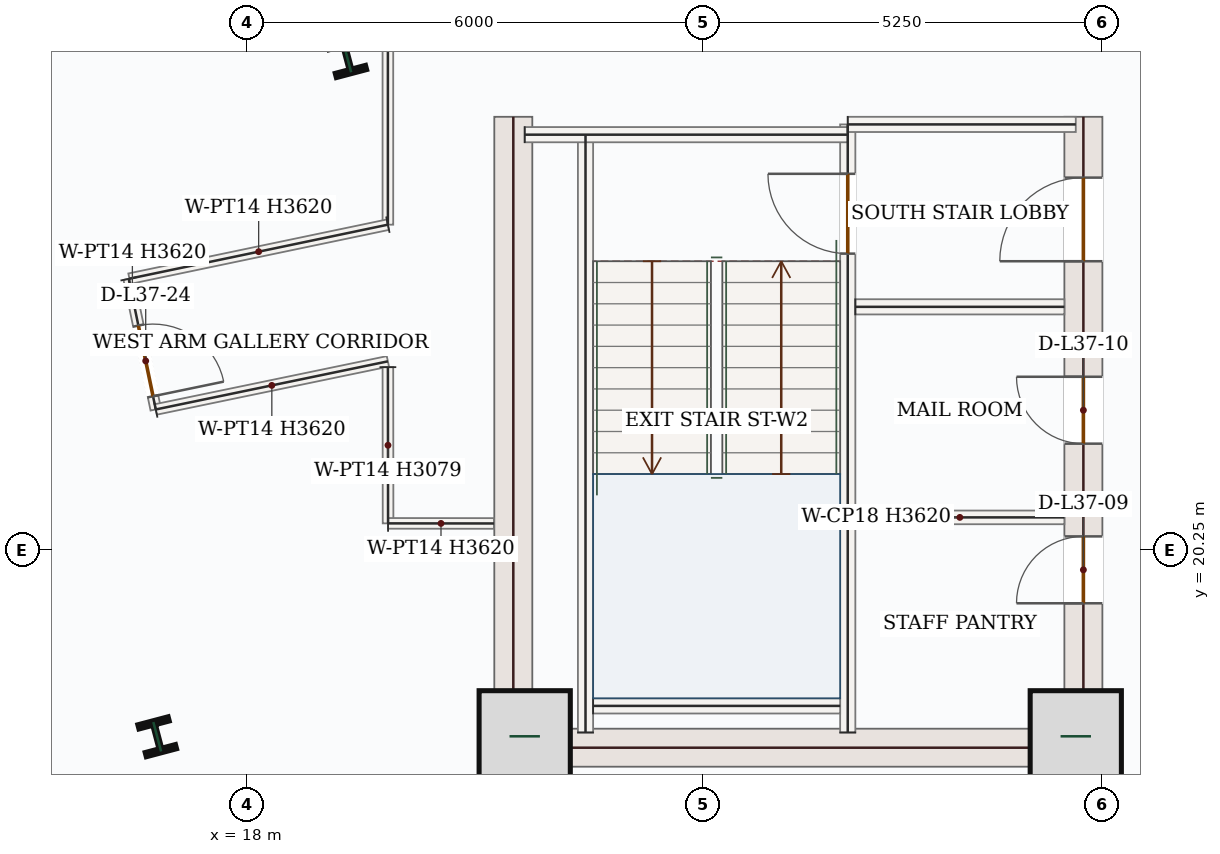
"""IFC4 building model, lengths in metres.
Left out: names, types, materials, properties, quantities, classifications, styles, units other than length and angle.
Written with IfcOpenShell. Run it as: python <this file> out.ifc"""

import sys

from ifc_helpers import new_model, si_unit, direction, frame, frame_2d, origin, origin_2d, place, context, subcontext, project, spatial, rectangle, i_section, extrude, source, transform, mapped, element, fill, save


model = new_model("IFC4")
c1 = context("Model", 3, precision=1e-05, world=origin(), true_north=direction((0.0, 1.0)))
c2 = subcontext(c1, "Body", "Model", "MODEL_VIEW")
j1 = project(units=[si_unit("LENGTHUNIT", "METRE"), si_unit("PLANEANGLEUNIT", "RADIAN")], contexts=[c1])
p1 = place(None, origin())
s1 = spatial("IfcSite", under=j1, at=p1, CompositionType="ELEMENT")
p2 = place(p1, origin())
s2 = spatial("IfcBuilding", under=s1, at=p2, CompositionType="ELEMENT")
p3 = place(p2, frame((0.0, 0.0, 162.9)))
s3 = spatial("IfcBuildingStorey", under=s2, at=p3, CompositionType="ELEMENT", Elevation=162.9)
m1 = source(origin(), c2, "Body", "SweptSolid", [
    extrude(rectangle(XDim=8.55, YDim=0.5, at=frame_2d((4.275, 0.0))), origin(), (0.0, 0.0, 1.0), 3.62),
])
p4 = place(p3, frame((21.5, 17.4, 0.0), z_axis=(0.0, 0.0, 1.0), x_axis=(0.0, 1.0, 0.0)))
e1 = element("IfcWall", 1, at=p4, inside=s3, PredefinedType="SHEAR", context=c2, shape_type="MappedRepresentation", body=[
    mapped(m1, transform((0.0, 0.0, 0.0), x_axis=(1.0, 0.0, 0.0), y_axis=(0.0, 1.0, 0.0), z_axis=(0.0, 0.0, 1.0), scale=1.0)),
])
p5 = place(p3, frame((29.0, 17.4, 0.0), z_axis=(0.0, 0.0, 1.0), x_axis=(0.0, 1.0, 0.0)))
e2 = element("IfcWall", 2, at=p5, inside=s3, PredefinedType="SHEAR", context=c2, shape_type="SweptSolid", body=[
    extrude(rectangle(XDim=8.55, YDim=0.5, at=frame_2d((4.275, 0.0))), origin(), (0.0, 0.0, 1.0), 3.62),
])
p6 = place(p5, frame((6.65, 0.0, 0.0)))
e3 = element("IfcOpeningElement", 3, at=p6, cuts=e2, PredefinedType="OPENING", context=c2, shape_type="SweptSolid", body=[
    extrude(rectangle(XDim=1.1, YDim=2.2, at=frame_2d((0.55, 1.1))), frame((0.0, 0.26, 0.0), z_axis=(0.0, -1.0, 0.0), x_axis=(1.0, 0.0, 0.0)), (0.0, 0.0, 1.0), 0.52),
])
p7 = place(p5, frame((2.15, 0.0, 0.0)))
e4 = element("IfcOpeningElement", 4, at=p7, cuts=e2, PredefinedType="OPENING", context=c2, shape_type="SweptSolid", body=[
    extrude(rectangle(XDim=0.88, YDim=2.1, at=frame_2d((0.44, 1.05))), frame((0.0, 0.26, 0.0), z_axis=(0.0, -1.0, 0.0), x_axis=(1.0, 0.0, 0.0)), (0.0, 0.0, 1.0), 0.52),
])
p8 = place(p5, frame((4.25, 0.0, 0.0)))
e5 = element("IfcOpeningElement", 5, at=p8, cuts=e2, PredefinedType="OPENING", context=c2, shape_type="SweptSolid", body=[
    extrude(rectangle(XDim=0.88, YDim=2.1, at=frame_2d((0.44, 1.05))), frame((0.0, 0.26, 0.0), z_axis=(0.0, -1.0, 0.0), x_axis=(1.0, 0.0, 0.0)), (0.0, 0.0, 1.0), 0.52),
])
m2 = source(origin(), c2, "Body", "SweptSolid", [
    extrude(rectangle(XDim=7.0, YDim=0.5, at=frame_2d((3.5, 0.0))), origin(), (0.0, 0.0, 1.0), 3.62),
])
p9 = place(p3, frame((21.75, 17.65, 0.0), z_axis=(0.0, 0.0, 1.0), x_axis=(1.0, 0.0, 0.0)))
e6 = element("IfcWall", 6, at=p9, inside=s3, PredefinedType="SHEAR", context=c2, shape_type="MappedRepresentation", body=[
    mapped(m2, transform((0.0, 0.0, 0.0), x_axis=(1.0, 0.0, 0.0), y_axis=(0.0, 1.0, 0.0), z_axis=(0.0, 0.0, 1.0), scale=1.0)),
])
m3 = source(origin(), c2, "Body", "SweptSolid", [
    extrude(rectangle(XDim=1.2, YDim=1.2, at=origin_2d()), origin(), (0.0, 0.0, 1.0), 3.9),
])
for number, where, z_axis, x_axis in (
    (7, (21.65, 17.8, 0.0), (0.0, 0.0, 1.0), (1.0, 0.0, 0.0)),
    (8, (28.9, 17.8, 0.0), (0.0, 0.0, 1.0), (1.0, 0.0, 0.0)),
):
    element("IfcColumn", number, at=place(p3, frame(where, z_axis=z_axis, x_axis=x_axis)), inside=s3, PredefinedType="COLUMN", context=c2, shape_type="MappedRepresentation", body=[
        mapped(m3, transform((0.0, 0.0, 0.0), x_axis=(1.0, 0.0, 0.0), y_axis=(0.0, 1.0, 0.0), z_axis=(0.0, 0.0, 1.0), scale=1.0)),
    ])
m4 = source(origin(), c2, "Body", "SweptSolid", [
    extrude(i_section(OverallWidth=0.412, OverallDepth=0.435, WebThickness=0.036, FlangeThickness=0.057, FilletRadius=0.018, at=origin_2d()), origin(), (0.0, 0.0, 1.0), 3.9),
])
for number, where, z_axis, x_axis in (
    (9, (19.316, 26.729, 0.0), (0.0, 0.0, 1.0), (0.967, 0.255, 0.0)),
    (10, (16.815, 17.794, 0.0), (0.0, 0.0, 1.0), (0.967, 0.255, 0.0)),
):
    element("IfcColumn", number, at=place(p3, frame(where, z_axis=z_axis, x_axis=x_axis)), inside=s3, PredefinedType="COLUMN", context=c2, shape_type="MappedRepresentation", body=[
        mapped(m4, transform((0.0, 0.0, 0.0), x_axis=(1.0, 0.0, 0.0), y_axis=(0.0, 1.0, 0.0), z_axis=(0.0, 0.0, 1.0), scale=1.0)),
    ])
m5 = source(origin(), c2, "Body", "SweptSolid", [
    extrude(rectangle(XDim=7.87, YDim=0.2, at=frame_2d((3.935, 0.0))), origin(), (0.0, 0.0, 1.0), 3.62),
])
p10 = place(p3, frame((22.45, 17.85, 0.0), z_axis=(0.0, 0.0, 1.0), x_axis=(0.0, 1.0, 0.0)))
e11 = element("IfcWall", 11, at=p10, inside=s3, PredefinedType="SOLIDWALL", context=c2, shape_type="MappedRepresentation", body=[
    mapped(m5, transform((0.0, 0.0, 0.0), x_axis=(1.0, 0.0, 0.0), y_axis=(0.0, 1.0, 0.0), z_axis=(0.0, 0.0, 1.0), scale=1.0)),
])
p11 = place(p3, frame((25.9, 17.85, 0.0), z_axis=(0.0, 0.0, 1.0), x_axis=(0.0, 1.0, 0.0)))
e12 = element("IfcWall", 12, at=p11, inside=s3, PredefinedType="SOLIDWALL", context=c2, shape_type="SweptSolid", body=[
    extrude(rectangle(XDim=8.0, YDim=0.2, at=frame_2d((4.0, 0.0))), origin(), (0.0, 0.0, 1.0), 3.62),
])
p12 = place(p11, frame((6.3, 0.0, 0.0)))
e13 = element("IfcOpeningElement", 13, at=p12, cuts=e12, PredefinedType="OPENING", context=c2, shape_type="SweptSolid", body=[
    extrude(rectangle(XDim=1.05, YDim=2.15, at=frame_2d((0.525, 1.075))), frame((0.0, 0.11, 0.0), z_axis=(0.0, -1.0, 0.0), x_axis=(1.0, 0.0, 0.0)), (0.0, 0.0, 1.0), 0.22),
])
m6 = source(origin(), c2, "Body", "SweptSolid", [
    extrude(rectangle(XDim=4.25, YDim=0.2, at=frame_2d((2.125, 0.0))), origin(), (0.0, 0.0, 1.0), 3.62),
])
p13 = place(p3, frame((21.65, 25.715, 0.0), z_axis=(0.0, 0.0, 1.0), x_axis=(1.0, 0.0, 0.0)))
e14 = element("IfcWall", 14, at=p13, inside=s3, PredefinedType="SOLIDWALL", context=c2, shape_type="MappedRepresentation", body=[
    mapped(m6, transform((0.0, 0.0, 0.0), x_axis=(1.0, 0.0, 0.0), y_axis=(0.0, 1.0, 0.0), z_axis=(0.0, 0.0, 1.0), scale=1.0)),
])
m7 = source(origin(), c2, "Body", "SweptSolid", [
    extrude(rectangle(XDim=3.0, YDim=0.2, at=frame_2d((1.5, 0.0))), origin(), (0.0, 0.0, 1.0), 3.62),
])
p14 = place(p3, frame((25.9, 25.85, 0.0), z_axis=(0.0, 0.0, 1.0), x_axis=(1.0, 0.0, 0.0)))
e15 = element("IfcWall", 15, at=p14, inside=s3, PredefinedType="SOLIDWALL", context=c2, shape_type="MappedRepresentation", body=[
    mapped(m7, transform((0.0, 0.0, 0.0), x_axis=(1.0, 0.0, 0.0), y_axis=(0.0, 1.0, 0.0), z_axis=(0.0, 0.0, 1.0), scale=1.0)),
])
m8 = source(origin(), c2, "Body", "SweptSolid", [
    extrude(rectangle(XDim=3.25, YDim=0.2, at=frame_2d((1.625, 0.0))), origin(), (0.0, 0.0, 1.0), 3.62),
])
p15 = place(p3, frame((22.55, 18.2, 0.0), z_axis=(0.0, 0.0, 1.0), x_axis=(1.0, 0.0, 0.0)))
e16 = element("IfcWall", 16, at=p15, inside=s3, PredefinedType="SOLIDWALL", context=c2, shape_type="MappedRepresentation", body=[
    mapped(m8, transform((0.0, 0.0, 0.0), x_axis=(1.0, 0.0, 0.0), y_axis=(0.0, 1.0, 0.0), z_axis=(0.0, 0.0, 1.0), scale=1.0)),
])
m9 = source(origin(), c2, "Body", "SweptSolid", [
    extrude(rectangle(XDim=2.75, YDim=0.2, at=frame_2d((1.375, 0.0))), origin(), (0.0, 0.0, 1.0), 3.62),
])
p16 = place(p3, frame((26.0, 23.45, 0.0), z_axis=(0.0, 0.0, 1.0), x_axis=(1.0, 0.0, 0.0)))
e17 = element("IfcWall", 17, at=p16, inside=s3, PredefinedType="SOLIDWALL", context=c2, shape_type="MappedRepresentation", body=[
    mapped(m9, transform((0.0, 0.0, 0.0), x_axis=(1.0, 0.0, 0.0), y_axis=(0.0, 1.0, 0.0), z_axis=(0.0, 0.0, 1.0), scale=1.0)),
])
m10 = source(origin(), c2, "Body", "SweptSolid", [
    extrude(rectangle(XDim=2.75, YDim=0.18, at=frame_2d((1.375, 0.0))), origin(), (0.0, 0.0, 1.0), 3.62),
])
p17 = place(p3, frame((26.0, 20.68, 0.0), z_axis=(0.0, 0.0, 1.0), x_axis=(1.0, 0.0, 0.0)))
e18 = element("IfcWall", 18, at=p17, inside=s3, PredefinedType="PARTITIONING", context=c2, shape_type="MappedRepresentation", body=[
    mapped(m10, transform((0.0, 0.0, 0.0), x_axis=(1.0, 0.0, 0.0), y_axis=(0.0, 1.0, 0.0), z_axis=(0.0, 0.0, 1.0), scale=1.0)),
])
p18 = place(p3, frame((16.44, 23.818, 0.0), z_axis=(0.0, 0.0, 1.0), x_axis=(0.202959786933, -0.979187073489, 0.0)))
e19 = element("IfcWall", 19, at=p18, inside=s3, PredefinedType="PARTITIONING", context=c2, shape_type="SweptSolid", body=[
    extrude(rectangle(XDim=1.755, YDim=0.14, at=frame_2d((0.877, 0.0))), origin(), (0.0, 0.0, 1.0), 3.62),
])
p19 = place(p18, frame((0.628, 0.0, 0.0)))
e20 = element("IfcOpeningElement", 20, at=p19, cuts=e19, PredefinedType="OPENING", context=c2, shape_type="SweptSolid", body=[
    extrude(rectangle(XDim=0.95, YDim=2.15, at=frame_2d((0.475, 1.075))), frame((0.0, 0.08, 0.0), z_axis=(0.0, -1.0, 0.0), x_axis=(1.0, 0.0, 0.0)), (0.0, 0.0, 1.0), 0.16),
])
m11 = source(origin(), c2, "Body", "SweptSolid", [
    extrude(rectangle(XDim=3.119, YDim=0.14, at=frame_2d((1.56, 0.0))), origin(), (0.0, 0.0, 1.0), 3.62),
])
p20 = place(p3, frame((16.796, 22.1, 0.0), z_axis=(0.0, 0.0, 1.0), x_axis=(0.979183767092, 0.202975738114, 0.0)))
e21 = element("IfcWall", 21, at=p20, inside=s3, PredefinedType="PARTITIONING", context=c2, shape_type="MappedRepresentation", body=[
    mapped(m11, transform((0.0, 0.0, 0.0), x_axis=(1.0, 0.0, 0.0), y_axis=(0.0, 1.0, 0.0), z_axis=(0.0, 0.0, 1.0), scale=1.0)),
])
m12 = source(origin(), c2, "Body", "SweptSolid", [
    extrude(rectangle(XDim=2.055, YDim=0.14, at=frame_2d((1.028, 0.0))), origin(), (0.0, 0.0, 1.0), 3.079),
])
p21 = place(p3, frame((19.85, 22.656, 0.0), z_axis=(0.0, 0.0, 1.0), x_axis=(0.001069136951, -0.999999428473, 0.0)))
e22 = element("IfcWall", 22, at=p21, inside=s3, PredefinedType="PARTITIONING", context=c2, shape_type="MappedRepresentation", body=[
    mapped(m12, transform((0.0, 0.0, 0.0), x_axis=(1.0, 0.0, 0.0), y_axis=(0.0, 1.0, 0.0), z_axis=(0.0, 0.0, 1.0), scale=1.0)),
])
m13 = source(origin(), c2, "Body", "SweptSolid", [
    extrude(rectangle(XDim=1.393, YDim=0.14, at=frame_2d((0.696, 0.0))), origin(), (0.0, 0.0, 1.0), 3.62),
])
p22 = place(p3, frame((19.852, 20.601, 0.0), z_axis=(0.0, 0.0, 1.0), x_axis=(0.999999615941, -0.000876423853, 0.0)))
e23 = element("IfcWall", 23, at=p22, inside=s3, PredefinedType="PARTITIONING", context=c2, shape_type="MappedRepresentation", body=[
    mapped(m13, transform((0.0, 0.0, 0.0), x_axis=(1.0, 0.0, 0.0), y_axis=(0.0, 1.0, 0.0), z_axis=(0.0, 0.0, 1.0), scale=1.0)),
])
m14 = source(origin(), c2, "Body", "SweptSolid", [
    extrude(rectangle(XDim=8.794, YDim=0.14, at=frame_2d((4.397, 0.0))), origin(), (0.0, 0.0, 1.0), 2.693),
])
p23 = place(p3, frame((19.85, 33.325, 0.0), z_axis=(0.0, 0.0, 1.0), x_axis=(-2.7762354e-05, -0.999999999615, 0.0)))
e24 = element("IfcWall", 24, at=p23, inside=s3, PredefinedType="PARTITIONING", context=c2, shape_type="MappedRepresentation", body=[
    mapped(m14, transform((0.0, 0.0, 0.0), x_axis=(1.0, 0.0, 0.0), y_axis=(0.0, 1.0, 0.0), z_axis=(0.0, 0.0, 1.0), scale=1.0)),
])
m15 = source(origin(), c2, "Body", "SweptSolid", [
    extrude(rectangle(XDim=3.474, YDim=0.14, at=frame_2d((1.737, 0.0))), origin(), (0.0, 0.0, 1.0), 3.62),
])
p24 = place(p3, frame((19.85, 24.531, 0.0), z_axis=(0.0, 0.0, 1.0), x_axis=(-0.978846306479, -0.204596941061, 0.0)))
e25 = element("IfcWall", 25, at=p24, inside=s3, PredefinedType="PARTITIONING", context=c2, shape_type="MappedRepresentation", body=[
    mapped(m15, transform((0.0, 0.0, 0.0), x_axis=(1.0, 0.0, 0.0), y_axis=(0.0, 1.0, 0.0), z_axis=(0.0, 0.0, 1.0), scale=1.0)),
])
m16 = source(origin(), c2, "Body", "SweptSolid", [
    extrude(rectangle(XDim=1.05, YDim=2.15, at=frame_2d((0.525, 1.075))), frame((0.0, 0.025, 0.0), z_axis=(0.0, -1.0, 0.0), x_axis=(1.0, 0.0, 0.0)), (0.0, 0.0, 1.0), 0.05),
])
p25 = place(p12, origin())
e26 = element("IfcDoor", 26, at=p25, inside=s3, OperationType="SINGLE_SWING_RIGHT", PredefinedType="DOOR", context=c2, shape_type="MappedRepresentation", body=[
    mapped(m16, transform((0.0, 0.0, 0.0), x_axis=(1.0, 0.0, 0.0), y_axis=(0.0, 1.0, 0.0), z_axis=(0.0, 0.0, 1.0), scale=1.0)),
])
fill(e13, e26)
m17 = source(origin(), c2, "Body", "SweptSolid", [
    extrude(rectangle(XDim=1.1, YDim=2.2, at=frame_2d((0.55, 1.1))), frame((0.0, 0.025, 0.0), z_axis=(0.0, -1.0, 0.0), x_axis=(1.0, 0.0, 0.0)), (0.0, 0.0, 1.0), 0.05),
])
p26 = place(p6, origin())
e27 = element("IfcDoor", 27, at=p26, inside=s3, OperationType="SINGLE_SWING_LEFT", PredefinedType="DOOR", context=c2, shape_type="MappedRepresentation", body=[
    mapped(m17, transform((0.0, 0.0, 0.0), x_axis=(1.0, 0.0, 0.0), y_axis=(0.0, 1.0, 0.0), z_axis=(0.0, 0.0, 1.0), scale=1.0)),
])
fill(e3, e27)
m18 = source(origin(), c2, "Body", "SweptSolid", [
    extrude(rectangle(XDim=0.88, YDim=2.1, at=frame_2d((0.44, 1.05))), frame((0.0, 0.025, 0.0), z_axis=(0.0, -1.0, 0.0), x_axis=(1.0, 0.0, 0.0)), (0.0, 0.0, 1.0), 0.05),
])
p27 = place(p7, origin())
e28 = element("IfcDoor", 28, at=p27, inside=s3, OperationType="SINGLE_SWING_LEFT", PredefinedType="DOOR", context=c2, shape_type="MappedRepresentation", body=[
    mapped(m18, transform((0.0, 0.0, 0.0), x_axis=(1.0, 0.0, 0.0), y_axis=(0.0, 1.0, 0.0), z_axis=(0.0, 0.0, 1.0), scale=1.0)),
])
fill(e4, e28)
p28 = place(p8, origin())
e29 = element("IfcDoor", 29, at=p28, inside=s3, OperationType="SINGLE_SWING_RIGHT", PredefinedType="DOOR", context=c2, shape_type="MappedRepresentation", body=[
    mapped(m18, transform((0.0, 0.0, 0.0), x_axis=(1.0, 0.0, 0.0), y_axis=(0.0, 1.0, 0.0), z_axis=(0.0, 0.0, 1.0), scale=1.0)),
])
fill(e5, e29)
m19 = source(origin(), c2, "Body", "SweptSolid", [
    extrude(rectangle(XDim=0.95, YDim=2.15, at=frame_2d((0.475, 1.075))), frame((0.0, 0.025, 0.0), z_axis=(0.0, -1.0, 0.0), x_axis=(1.0, 0.0, 0.0)), (0.0, 0.0, 1.0), 0.05),
])
p29 = place(p19, origin())
e30 = element("IfcDoor", 30, at=p29, inside=s3, OperationType="SINGLE_SWING_RIGHT", PredefinedType="DOOR", context=c2, shape_type="MappedRepresentation", body=[
    mapped(m19, transform((0.0, 0.0, 0.0), x_axis=(1.0, 0.0, 0.0), y_axis=(0.0, 1.0, 0.0), z_axis=(0.0, 0.0, 1.0), scale=1.0)),
])
fill(e20, e30)
save(model, sys.argv[1])
